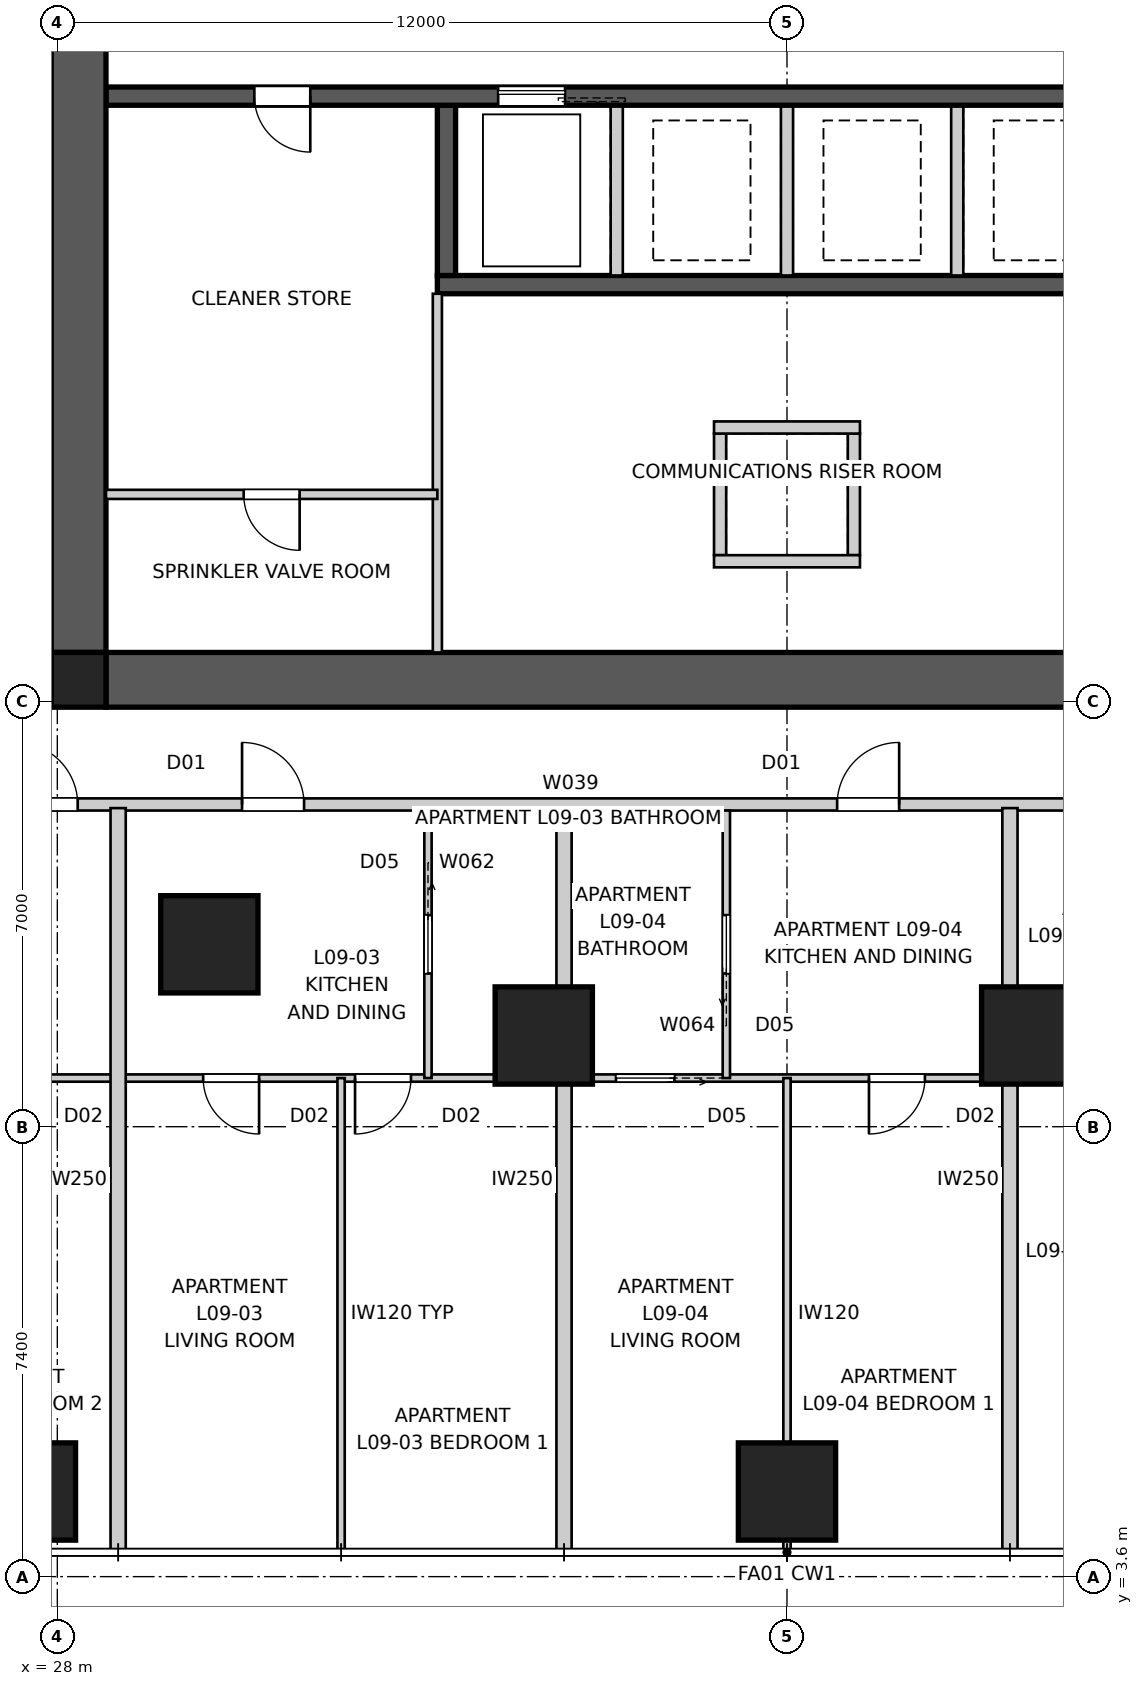
"""IFC4 building model, lengths in metres.
Left out: names, types, materials, properties, quantities, classifications, styles, units other than length and angle.
Written with IfcOpenShell. Run it as: python <this file> out.ifc"""

import sys

from ifc_helpers import new_model, si_unit, direction, frame, frame_2d, origin, origin_2d, place, context, subcontext, project, spatial, polyline, rectangle, outline, extrude, element, fill, save


model = new_model("IFC4")
c1 = context("Model", 3, precision=1e-05, world=origin(), true_north=direction((0.0, 1.0)))
c2 = subcontext(c1, "Body", "Model", "MODEL_VIEW")
j1 = project(units=[si_unit("LENGTHUNIT", "METRE"), si_unit("PLANEANGLEUNIT", "RADIAN")], contexts=[c1])
p1 = place(None, origin())
s1 = spatial("IfcSite", under=j1, at=p1, CompositionType="ELEMENT")
p2 = place(p1, origin())
s2 = spatial("IfcBuilding", under=s1, at=p2, CompositionType="ELEMENT")
p3 = place(p2, frame((0.0, 0.0, 35.4)))
s3 = spatial("IfcBuildingStorey", under=s2, at=p3, CompositionType="ELEMENT", Elevation=35.4)
p4 = place(p3, frame((51.2, 18.35, 0.0), z_axis=(0.0, 0.0, 1.0), x_axis=(-1.0, 0.0, 0.0)))
e1 = element("IfcWall", 1, at=p4, inside=s3, PredefinedType="SHEAR", context=c2, shape_type="SweptSolid", body=[
    extrude(outline(polyline([(0.0, -0.45), (22.4, -0.45), (22.4, -0.025), (22.85, -0.025), (22.85, 0.025), (22.4, 0.025), (22.4, 0.45), (0.0, 0.45), (0.0, 0.025), (-0.45, 0.025), (-0.45, -0.025), (0.0, -0.025), (0.0, -0.45)])), origin(), (0.0, 0.0, 1.0), 3.4),
])
p5 = place(p3, frame((28.35, 41.2, 0.0), z_axis=(0.0, 0.0, 1.0), x_axis=(0.0, -1.0, 0.0)))
e2 = element("IfcWall", 2, at=p5, inside=s3, PredefinedType="SHEAR", context=c2, shape_type="SweptSolid", body=[
    extrude(outline(polyline([(0.0, -0.45), (22.4, -0.45), (22.4, -0.025), (22.85, -0.025), (22.85, 0.025), (22.4, 0.025), (22.4, 0.45), (0.0, 0.45), (0.0, 0.025), (-0.45, 0.025), (-0.45, -0.025), (0.0, -0.025), (0.0, -0.45)])), origin(), (0.0, 0.0, 1.0), 3.4),
])
p6 = place(p5, frame((11.14, 0.0, 0.0)))
e3 = element("IfcOpeningElement", 3, at=p6, cuts=e2, PredefinedType="OPENING", context=c2, shape_type="SweptSolid", body=[
    extrude(rectangle(XDim=1.02, YDim=2.4, at=frame_2d((0.51, 1.2))), frame((0.0, 0.46, 0.0), z_axis=(0.0, -1.0, 0.0), x_axis=(1.0, 0.0, 0.0)), (0.0, 0.0, 1.0), 0.92),
])
p7 = place(p3, frame((51.2, 27.95, 0.0), z_axis=(0.0, 0.0, 1.0), x_axis=(-1.0, 0.0, 0.0)))
e4 = element("IfcWall", 4, at=p7, inside=s3, PredefinedType="SHEAR", context=c2, shape_type="SweptSolid", body=[
    extrude(rectangle(XDim=22.4, YDim=0.3, at=frame_2d((11.2, 0.0))), origin(), (0.0, 0.0, 1.0), 3.4),
])
p8 = place(p7, frame((19.04, 0.0, 0.0)))
e5 = element("IfcOpeningElement", 5, at=p8, cuts=e4, PredefinedType="OPENING", context=c2, shape_type="SweptSolid", body=[
    extrude(rectangle(XDim=0.92, YDim=2.1, at=frame_2d((0.46, 1.05))), frame((0.0, 0.16, 0.0), z_axis=(0.0, -1.0, 0.0), x_axis=(1.0, 0.0, 0.0)), (0.0, 0.0, 1.0), 0.32),
])
p9 = place(p7, frame((1.265, 0.0, 0.0)))
e6 = element("IfcOpeningElement", 6, at=p9, cuts=e4, PredefinedType="OPENING", context=c2, shape_type="SweptSolid", body=[
    extrude(rectangle(XDim=1.02, YDim=2.1, at=frame_2d((0.51, 1.05))), frame((0.0, 0.16, 0.0), z_axis=(0.0, -1.0, 0.0), x_axis=(1.0, 0.0, 0.0)), (0.0, 0.0, 1.0), 0.32),
])
p10 = place(p7, frame((4.015, 0.0, 0.0)))
e7 = element("IfcOpeningElement", 7, at=p10, cuts=e4, PredefinedType="OPENING", context=c2, shape_type="SweptSolid", body=[
    extrude(rectangle(XDim=0.92, YDim=2.1, at=frame_2d((0.46, 1.05))), frame((0.0, 0.16, 0.0), z_axis=(0.0, -1.0, 0.0), x_axis=(1.0, 0.0, 0.0)), (0.0, 0.0, 1.0), 0.32),
])
p11 = place(p7, frame((14.85, 0.0, 0.0)))
e8 = element("IfcOpeningElement", 8, at=p11, cuts=e4, PredefinedType="OPENING", context=c2, shape_type="SweptSolid", body=[
    extrude(rectangle(XDim=1.1, YDim=2.1, at=frame_2d((0.55, 1.05))), frame((0.0, 0.16, 0.0), z_axis=(0.0, -1.0, 0.0), x_axis=(1.0, 0.0, 0.0)), (0.0, 0.0, 1.0), 0.32),
])
p12 = place(p3, frame((45.75, 24.85, 0.0), z_axis=(0.0, 0.0, 1.0), x_axis=(-1.0, 0.0, 0.0)))
e9 = element("IfcWall", 9, at=p12, inside=s3, PredefinedType="SHEAR", context=c2, shape_type="SweptSolid", body=[
    extrude(rectangle(XDim=11.5, YDim=0.3, at=frame_2d((5.75, 0.0))), origin(), (0.0, 0.0, 1.0), 3.4),
])
for number, where, z_axis, x_axis in (
    (10, (42.8, 27.8, 0.0), (0.0, 0.0, 1.0), (0.0, -1.0, 0.0)),
    (11, (40.0, 27.8, 0.0), (0.0, 0.0, 1.0), (0.0, -1.0, 0.0)),
    (12, (37.2, 27.8, 0.0), (0.0, 0.0, 1.0), (0.0, -1.0, 0.0)),
):
    element("IfcWall", number, at=place(p3, frame(where, z_axis=z_axis, x_axis=x_axis)), inside=s3, PredefinedType="SOLIDWALL", context=c2, shape_type="SweptSolid", body=[
        extrude(rectangle(XDim=2.8, YDim=0.2, at=frame_2d((1.4, 0.0))), origin(), (0.0, 0.0, 1.0), 3.4),
    ])
p13 = place(p3, frame((34.4, 27.8, 0.0), z_axis=(0.0, 0.0, 1.0), x_axis=(0.0, -1.0, 0.0)))
e13 = element("IfcWall", 13, at=p13, inside=s3, PredefinedType="SHEAR", context=c2, shape_type="SweptSolid", body=[
    extrude(rectangle(XDim=2.8, YDim=0.3, at=frame_2d((1.4, 0.0))), origin(), (0.0, 0.0, 1.0), 3.4),
])
for number, where, z_axis, x_axis in (
    (14, (38.9, 22.4, 0.0), (0.0, 0.0, 1.0), (0.0, -1.0, 0.0)),
    (15, (41.1, 22.4, 0.0), (0.0, 0.0, 1.0), (0.0, -1.0, 0.0)),
):
    element("IfcWall", number, at=place(p3, frame(where, z_axis=z_axis, x_axis=x_axis)), inside=s3, PredefinedType="SOLIDWALL", context=c2, shape_type="SweptSolid", body=[
        extrude(rectangle(XDim=2.0, YDim=0.2, at=frame_2d((1.0, 0.0))), origin(), (0.0, 0.0, 1.0), 3.4),
    ])
for number, where, z_axis, x_axis in (
    (16, (38.8, 22.5, 0.0), (0.0, 0.0, 1.0), (1.0, 0.0, 0.0)),
    (17, (38.8, 20.3, 0.0), (0.0, 0.0, 1.0), (1.0, 0.0, 0.0)),
):
    element("IfcWall", number, at=place(p3, frame(where, z_axis=z_axis, x_axis=x_axis)), inside=s3, PredefinedType="SOLIDWALL", context=c2, shape_type="SweptSolid", body=[
        extrude(rectangle(XDim=2.4, YDim=0.2, at=frame_2d((1.2, 0.0))), origin(), (0.0, 0.0, 1.0), 3.4),
    ])
p14 = place(p3, frame((28.35, 18.35, 0.0), z_axis=(0.0, 0.0, 1.0), x_axis=(1.0, 0.0, 0.0)))
e18 = element("IfcColumn", 18, at=p14, inside=s3, PredefinedType="COLUMN", context=c2, shape_type="SweptSolid", body=[
    extrude(rectangle(XDim=0.9, YDim=0.9, at=origin_2d()), origin(), (0.0, 0.0, 1.0), 3.4),
])
for number, where, z_axis, x_axis in (
    (19, (27.5, 5.0, 0.0), (0.0, 0.0, 1.0), (1.0, 0.0, 0.0)),
    (20, (40.0, 5.0, 0.0), (0.0, 0.0, 1.0), (1.0, 0.0, 0.0)),
    (21, (30.5, 14.0, 0.0), (0.0, 0.0, 1.0), (1.0, 0.0, 0.0)),
    (22, (36.0, 12.5, 0.0), (0.0, 0.0, 1.0), (1.0, 0.0, 0.0)),
    (23, (44.0, 12.5, 0.0), (0.0, 0.0, 1.0), (1.0, 0.0, 0.0)),
):
    element("IfcColumn", number, at=place(p3, frame(where, z_axis=z_axis, x_axis=x_axis)), inside=s3, PredefinedType="COLUMN", context=c2, shape_type="SweptSolid", body=[
        extrude(rectangle(XDim=1.6, YDim=1.6, at=origin_2d()), origin(), (0.0, 0.0, 1.0), 3.4),
    ])
p15 = place(p3, frame((26.3, 16.3, 0.0), z_axis=(0.0, 0.0, 1.0), x_axis=(1.0, 0.0, 0.0)))
e24 = element("IfcWall", 24, at=p15, inside=s3, PredefinedType="PARTITIONING", context=c2, shape_type="SweptSolid", body=[
    extrude(rectangle(XDim=28.2, YDim=0.2, at=frame_2d((14.1, 0.0))), origin(), (0.0, 0.0, 1.0), 3.25),
])
p16 = place(p15, frame((4.738, 0.0, 0.0)))
e25 = element("IfcOpeningElement", 25, at=p16, cuts=e24, PredefinedType="OPENING", context=c2, shape_type="SweptSolid", body=[
    extrude(rectangle(XDim=1.02, YDim=2.34, at=frame_2d((0.51, 1.17))), frame((0.0, 0.11, 0.0), z_axis=(0.0, -1.0, 0.0), x_axis=(1.0, 0.0, 0.0)), (0.0, 0.0, 1.0), 0.22),
])
p17 = place(p15, frame((14.525, 0.0, 0.0)))
e26 = element("IfcOpeningElement", 26, at=p17, cuts=e24, PredefinedType="OPENING", context=c2, shape_type="SweptSolid", body=[
    extrude(rectangle(XDim=1.02, YDim=2.34, at=frame_2d((0.51, 1.17))), frame((0.0, 0.11, 0.0), z_axis=(0.0, -1.0, 0.0), x_axis=(1.0, 0.0, 0.0)), (0.0, 0.0, 1.0), 0.22),
])
p18 = place(p15, frame((22.333, 0.0, 0.0)))
e27 = element("IfcOpeningElement", 27, at=p18, cuts=e24, PredefinedType="OPENING", context=c2, shape_type="SweptSolid", body=[
    extrude(rectangle(XDim=1.02, YDim=2.34, at=frame_2d((0.51, 1.17))), frame((0.0, 0.11, 0.0), z_axis=(0.0, -1.0, 0.0), x_axis=(1.0, 0.0, 0.0)), (0.0, 0.0, 1.0), 0.22),
])
p19 = place(p15, frame((25.765, 0.0, 0.0)))
e28 = element("IfcOpeningElement", 28, at=p19, cuts=e24, PredefinedType="OPENING", context=c2, shape_type="SweptSolid", body=[
    extrude(rectangle(XDim=1.02, YDim=2.1, at=frame_2d((0.51, 1.05))), frame((0.0, 0.11, 0.0), z_axis=(0.0, -1.0, 0.0), x_axis=(1.0, 0.0, 0.0)), (0.0, 0.0, 1.0), 0.22),
])
p20 = place(p15, frame((1.015, 0.0, 0.0)))
e29 = element("IfcOpeningElement", 29, at=p20, cuts=e24, PredefinedType="OPENING", context=c2, shape_type="SweptSolid", body=[
    extrude(rectangle(XDim=1.02, YDim=2.1, at=frame_2d((0.51, 1.05))), frame((0.0, 0.11, 0.0), z_axis=(0.0, -1.0, 0.0), x_axis=(1.0, 0.0, 0.0)), (0.0, 0.0, 1.0), 0.22),
])
for number, where, z_axis, x_axis in (
    (30, (29.0, 4.0, 0.0), (0.0, 0.0, 1.0), (0.0, 1.0, 0.0)),
    (31, (36.333, 4.0, 0.0), (0.0, 0.0, 1.0), (0.0, 1.0, 0.0)),
    (32, (43.667, 4.0, 0.0), (0.0, 0.0, 1.0), (0.0, 1.0, 0.0)),
):
    element("IfcWall", number, at=place(p3, frame(where, z_axis=z_axis, x_axis=x_axis)), inside=s3, PredefinedType="PARTITIONING", context=c2, shape_type="SweptSolid", body=[
        extrude(rectangle(XDim=12.24, YDim=0.25, at=frame_2d((6.12, 0.0))), origin(), (0.0, 0.0, 1.0), 3.25),
    ])
p21 = place(p3, frame((34.25, 18.8, 0.0), z_axis=(0.0, 0.0, 1.0), x_axis=(0.0, 1.0, 0.0)))
e33 = element("IfcWall", 33, at=p21, inside=s3, PredefinedType="SOLIDWALL", context=c2, shape_type="SweptSolid", body=[
    extrude(rectangle(XDim=5.9, YDim=0.15, at=frame_2d((2.95, 0.0))), origin(), (0.0, 0.0, 1.0), 3.25),
])
p22 = place(p3, frame((34.25, 21.4, 0.0), z_axis=(0.0, 0.0, 1.0), x_axis=(-1.0, 0.0, 0.0)))
e34 = element("IfcWall", 34, at=p22, inside=s3, PredefinedType="SOLIDWALL", context=c2, shape_type="SweptSolid", body=[
    extrude(rectangle(XDim=5.45, YDim=0.15, at=frame_2d((2.725, 0.0))), origin(), (0.0, 0.0, 1.0), 3.25),
])
p23 = place(p22, frame((2.265, 0.0, 0.0)))
e35 = element("IfcOpeningElement", 35, at=p23, cuts=e34, PredefinedType="OPENING", context=c2, shape_type="SweptSolid", body=[
    extrude(rectangle(XDim=0.92, YDim=2.1, at=frame_2d((0.46, 1.05))), frame((0.0, 0.085, 0.0), z_axis=(0.0, -1.0, 0.0), x_axis=(1.0, 0.0, 0.0)), (0.0, 0.0, 1.0), 0.17),
])
p24 = place(p3, frame((47.287, 11.8, 0.0), z_axis=(0.0, 0.0, 1.0), x_axis=(-1.0, 0.0, 0.0)))
e36 = element("IfcWall", 36, at=p24, inside=s3, PredefinedType="PARTITIONING", context=c2, shape_type="SweptSolid", body=[
    extrude(rectangle(XDim=22.003, YDim=0.12, at=frame_2d((11.002, 0.0))), origin(), (0.0, 0.0, 1.0), 3.25),
])
p25 = place(p24, frame((15.968, 0.0, 0.0)))
e37 = element("IfcOpeningElement", 37, at=p25, cuts=e36, PredefinedType="OPENING", context=c2, shape_type="SweptSolid", body=[
    extrude(rectangle(XDim=0.92, YDim=2.34, at=frame_2d((0.46, 1.17))), frame((0.0, 0.07, 0.0), z_axis=(0.0, -1.0, 0.0), x_axis=(1.0, 0.0, 0.0)), (0.0, 0.0, 1.0), 0.14),
])
p26 = place(p24, frame((13.47, 0.0, 0.0)))
e38 = element("IfcOpeningElement", 38, at=p26, cuts=e36, PredefinedType="OPENING", context=c2, shape_type="SweptSolid", body=[
    extrude(rectangle(XDim=0.92, YDim=2.34, at=frame_2d((0.46, 1.17))), frame((0.0, 0.07, 0.0), z_axis=(0.0, -1.0, 0.0), x_axis=(1.0, 0.0, 0.0)), (0.0, 0.0, 1.0), 0.14),
])
p27 = place(p24, frame((5.018, 0.0, 0.0)))
e39 = element("IfcOpeningElement", 39, at=p27, cuts=e36, PredefinedType="OPENING", context=c2, shape_type="SweptSolid", body=[
    extrude(rectangle(XDim=0.92, YDim=2.34, at=frame_2d((0.46, 1.17))), frame((0.0, 0.07, 0.0), z_axis=(0.0, -1.0, 0.0), x_axis=(1.0, 0.0, 0.0)), (0.0, 0.0, 1.0), 0.14),
])
p28 = place(p24, frame((19.685, 0.0, 0.0)))
e40 = element("IfcOpeningElement", 40, at=p28, cuts=e36, PredefinedType="OPENING", context=c2, shape_type="SweptSolid", body=[
    extrude(rectangle(XDim=0.92, YDim=2.34, at=frame_2d((0.46, 1.17))), frame((0.0, 0.07, 0.0), z_axis=(0.0, -1.0, 0.0), x_axis=(1.0, 0.0, 0.0)), (0.0, 0.0, 1.0), 0.14),
])
p29 = place(p24, frame((9.138, 0.0, 0.0)))
e41 = element("IfcOpeningElement", 41, at=p29, cuts=e36, PredefinedType="OPENING", context=c2, shape_type="SweptSolid", body=[
    extrude(rectangle(XDim=0.96, YDim=2.1, at=frame_2d((0.48, 1.05))), frame((0.0, 0.07, 0.0), z_axis=(0.0, -1.0, 0.0), x_axis=(1.0, 0.0, 0.0)), (0.0, 0.0, 1.0), 0.14),
])
p30 = place(p3, frame((34.096, 16.2, 0.0), z_axis=(0.0, 0.0, 1.0), x_axis=(0.0, -1.0, 0.0)))
e42 = element("IfcWall", 42, at=p30, inside=s3, PredefinedType="PARTITIONING", context=c2, shape_type="SweptSolid", body=[
    extrude(rectangle(XDim=4.4, YDim=0.12, at=frame_2d((2.2, 0.0))), origin(), (0.0, 0.0, 1.0), 2.796),
])
p31 = place(p30, frame((1.72, 0.0, 0.0)))
e43 = element("IfcOpeningElement", 43, at=p31, cuts=e42, PredefinedType="OPENING", context=c2, shape_type="SweptSolid", body=[
    extrude(rectangle(XDim=0.96, YDim=2.1, at=frame_2d((0.48, 1.05))), frame((0.0, 0.07, 0.0), z_axis=(0.0, -1.0, 0.0), x_axis=(1.0, 0.0, 0.0)), (0.0, 0.0, 1.0), 0.14),
])
p32 = place(p3, frame((32.667, 11.8, 0.0), z_axis=(0.0, 0.0, 1.0), x_axis=(0.0, -1.0, 0.0)))
e44 = element("IfcWall", 44, at=p32, inside=s3, PredefinedType="PARTITIONING", context=c2, shape_type="SweptSolid", body=[
    extrude(rectangle(XDim=7.76, YDim=0.12, at=frame_2d((3.88, 0.0))), origin(), (0.0, 0.0, 1.0), 3.25),
])
p33 = place(p3, frame((39.003, 11.8, 0.0), z_axis=(0.0, 0.0, 1.0), x_axis=(0.0, 1.0, 0.0)))
e45 = element("IfcWall", 45, at=p33, inside=s3, PredefinedType="PARTITIONING", context=c2, shape_type="SweptSolid", body=[
    extrude(rectangle(XDim=4.4, YDim=0.12, at=frame_2d((2.2, 0.0))), origin(), (0.0, 0.0, 1.0), 3.25),
])
p34 = place(p33, frame((1.72, 0.0, 0.0)))
e46 = element("IfcOpeningElement", 46, at=p34, cuts=e45, PredefinedType="OPENING", context=c2, shape_type="SweptSolid", body=[
    extrude(rectangle(XDim=0.96, YDim=2.1, at=frame_2d((0.48, 1.05))), frame((0.0, 0.07, 0.0), z_axis=(0.0, -1.0, 0.0), x_axis=(1.0, 0.0, 0.0)), (0.0, 0.0, 1.0), 0.14),
])
p35 = place(p3, frame((40.0, 11.8, 0.0), z_axis=(0.0, 0.0, 1.0), x_axis=(0.0, -1.0, 0.0)))
e47 = element("IfcWall", 47, at=p35, inside=s3, PredefinedType="PARTITIONING", context=c2, shape_type="SweptSolid", body=[
    extrude(rectangle(XDim=7.76, YDim=0.12, at=frame_2d((3.88, 0.0))), origin(), (0.0, 0.0, 1.0), 3.25),
])
p36 = place(p8, origin())
e48 = element("IfcDoor", 48, at=p36, inside=s3, OperationType="SINGLE_SWING_LEFT", PredefinedType="DOOR", context=c2, shape_type="SweptSolid", body=[
    extrude(rectangle(XDim=0.92, YDim=2.1, at=frame_2d((0.46, 1.05))), frame((0.0, 0.025, 0.0), z_axis=(0.0, -1.0, 0.0), x_axis=(1.0, 0.0, 0.0)), (0.0, 0.0, 1.0), 0.05),
])
fill(e5, e48)
p37 = place(p16, origin())
e49 = element("IfcDoor", 49, at=p37, inside=s3, OperationType="SINGLE_SWING_LEFT", PredefinedType="DOOR", context=c2, shape_type="SweptSolid", body=[
    extrude(rectangle(XDim=1.02, YDim=2.34, at=frame_2d((0.51, 1.17))), frame((0.0, 0.025, 0.0), z_axis=(0.0, -1.0, 0.0), x_axis=(1.0, 0.0, 0.0)), (0.0, 0.0, 1.0), 0.05),
])
fill(e25, e49)
p38 = place(p17, origin())
e50 = element("IfcDoor", 50, at=p38, inside=s3, OperationType="SINGLE_SWING_RIGHT", PredefinedType="DOOR", context=c2, shape_type="SweptSolid", body=[
    extrude(rectangle(XDim=1.02, YDim=2.34, at=frame_2d((0.51, 1.17))), frame((0.0, 0.025, 0.0), z_axis=(0.0, -1.0, 0.0), x_axis=(1.0, 0.0, 0.0)), (0.0, 0.0, 1.0), 0.05),
])
fill(e26, e50)
p39 = place(p20, origin())
e51 = element("IfcDoor", 51, at=p39, inside=s3, OperationType="SINGLE_SWING_LEFT", PredefinedType="DOOR", context=c2, shape_type="SweptSolid", body=[
    extrude(rectangle(XDim=1.02, YDim=2.1, at=frame_2d((0.51, 1.05))), frame((0.0, 0.025, 0.0), z_axis=(0.0, -1.0, 0.0), x_axis=(1.0, 0.0, 0.0)), (0.0, 0.0, 1.0), 0.05),
])
fill(e29, e51)
p40 = place(p23, origin())
e52 = element("IfcDoor", 52, at=p40, inside=s3, OperationType="SINGLE_SWING_LEFT", PredefinedType="DOOR", context=c2, shape_type="SweptSolid", body=[
    extrude(rectangle(XDim=0.92, YDim=2.1, at=frame_2d((0.46, 1.05))), frame((0.0, 0.025, 0.0), z_axis=(0.0, -1.0, 0.0), x_axis=(1.0, 0.0, 0.0)), (0.0, 0.0, 1.0), 0.05),
])
fill(e35, e52)
p41 = place(p31, origin())
e53 = element("IfcDoor", 53, at=p41, inside=s3, OperationType="SLIDING_TO_LEFT", PredefinedType="DOOR", context=c2, shape_type="SweptSolid", body=[
    extrude(rectangle(XDim=0.96, YDim=2.1, at=frame_2d((0.48, 1.05))), frame((0.0, 0.025, 0.0), z_axis=(0.0, -1.0, 0.0), x_axis=(1.0, 0.0, 0.0)), (0.0, 0.0, 1.0), 0.05),
])
fill(e43, e53)
p42 = place(p25, origin())
e54 = element("IfcDoor", 54, at=p42, inside=s3, OperationType="SINGLE_SWING_LEFT", PredefinedType="DOOR", context=c2, shape_type="SweptSolid", body=[
    extrude(rectangle(XDim=0.92, YDim=2.34, at=frame_2d((0.46, 1.17))), frame((0.0, 0.025, 0.0), z_axis=(0.0, -1.0, 0.0), x_axis=(1.0, 0.0, 0.0)), (0.0, 0.0, 1.0), 0.05),
])
fill(e37, e54)
p43 = place(p26, origin())
e55 = element("IfcDoor", 55, at=p43, inside=s3, OperationType="SINGLE_SWING_RIGHT", PredefinedType="DOOR", context=c2, shape_type="SweptSolid", body=[
    extrude(rectangle(XDim=0.92, YDim=2.34, at=frame_2d((0.46, 1.17))), frame((0.0, 0.025, 0.0), z_axis=(0.0, -1.0, 0.0), x_axis=(1.0, 0.0, 0.0)), (0.0, 0.0, 1.0), 0.05),
])
fill(e38, e55)
p44 = place(p34, origin())
e56 = element("IfcDoor", 56, at=p44, inside=s3, OperationType="SLIDING_TO_LEFT", PredefinedType="DOOR", context=c2, shape_type="SweptSolid", body=[
    extrude(rectangle(XDim=0.96, YDim=2.1, at=frame_2d((0.48, 1.05))), frame((0.0, 0.025, 0.0), z_axis=(0.0, -1.0, 0.0), x_axis=(1.0, 0.0, 0.0)), (0.0, 0.0, 1.0), 0.05),
])
fill(e46, e56)
p45 = place(p27, origin())
e57 = element("IfcDoor", 57, at=p45, inside=s3, OperationType="SINGLE_SWING_RIGHT", PredefinedType="DOOR", context=c2, shape_type="SweptSolid", body=[
    extrude(rectangle(XDim=0.92, YDim=2.34, at=frame_2d((0.46, 1.17))), frame((0.0, 0.025, 0.0), z_axis=(0.0, -1.0, 0.0), x_axis=(1.0, 0.0, 0.0)), (0.0, 0.0, 1.0), 0.05),
])
fill(e39, e57)
p46 = place(p29, origin())
e58 = element("IfcDoor", 58, at=p46, inside=s3, OperationType="SLIDING_TO_LEFT", PredefinedType="DOOR", context=c2, shape_type="SweptSolid", body=[
    extrude(rectangle(XDim=0.96, YDim=2.1, at=frame_2d((0.48, 1.05))), frame((0.0, 0.025, 0.0), z_axis=(0.0, -1.0, 0.0), x_axis=(1.0, 0.0, 0.0)), (0.0, 0.0, 1.0), 0.05),
])
fill(e41, e58)
p47 = place(p11, origin())
e59 = element("IfcDoor", 59, at=p47, inside=s3, OperationType="SLIDING_TO_LEFT", PredefinedType="DOOR", context=c2, shape_type="SweptSolid", body=[
    extrude(rectangle(XDim=1.1, YDim=2.1, at=frame_2d((0.55, 1.05))), frame((0.0, 0.025, 0.0), z_axis=(0.0, -1.0, 0.0), x_axis=(1.0, 0.0, 0.0)), (0.0, 0.0, 1.0), 0.05),
])
fill(e8, e59)
save(model, sys.argv[1])
